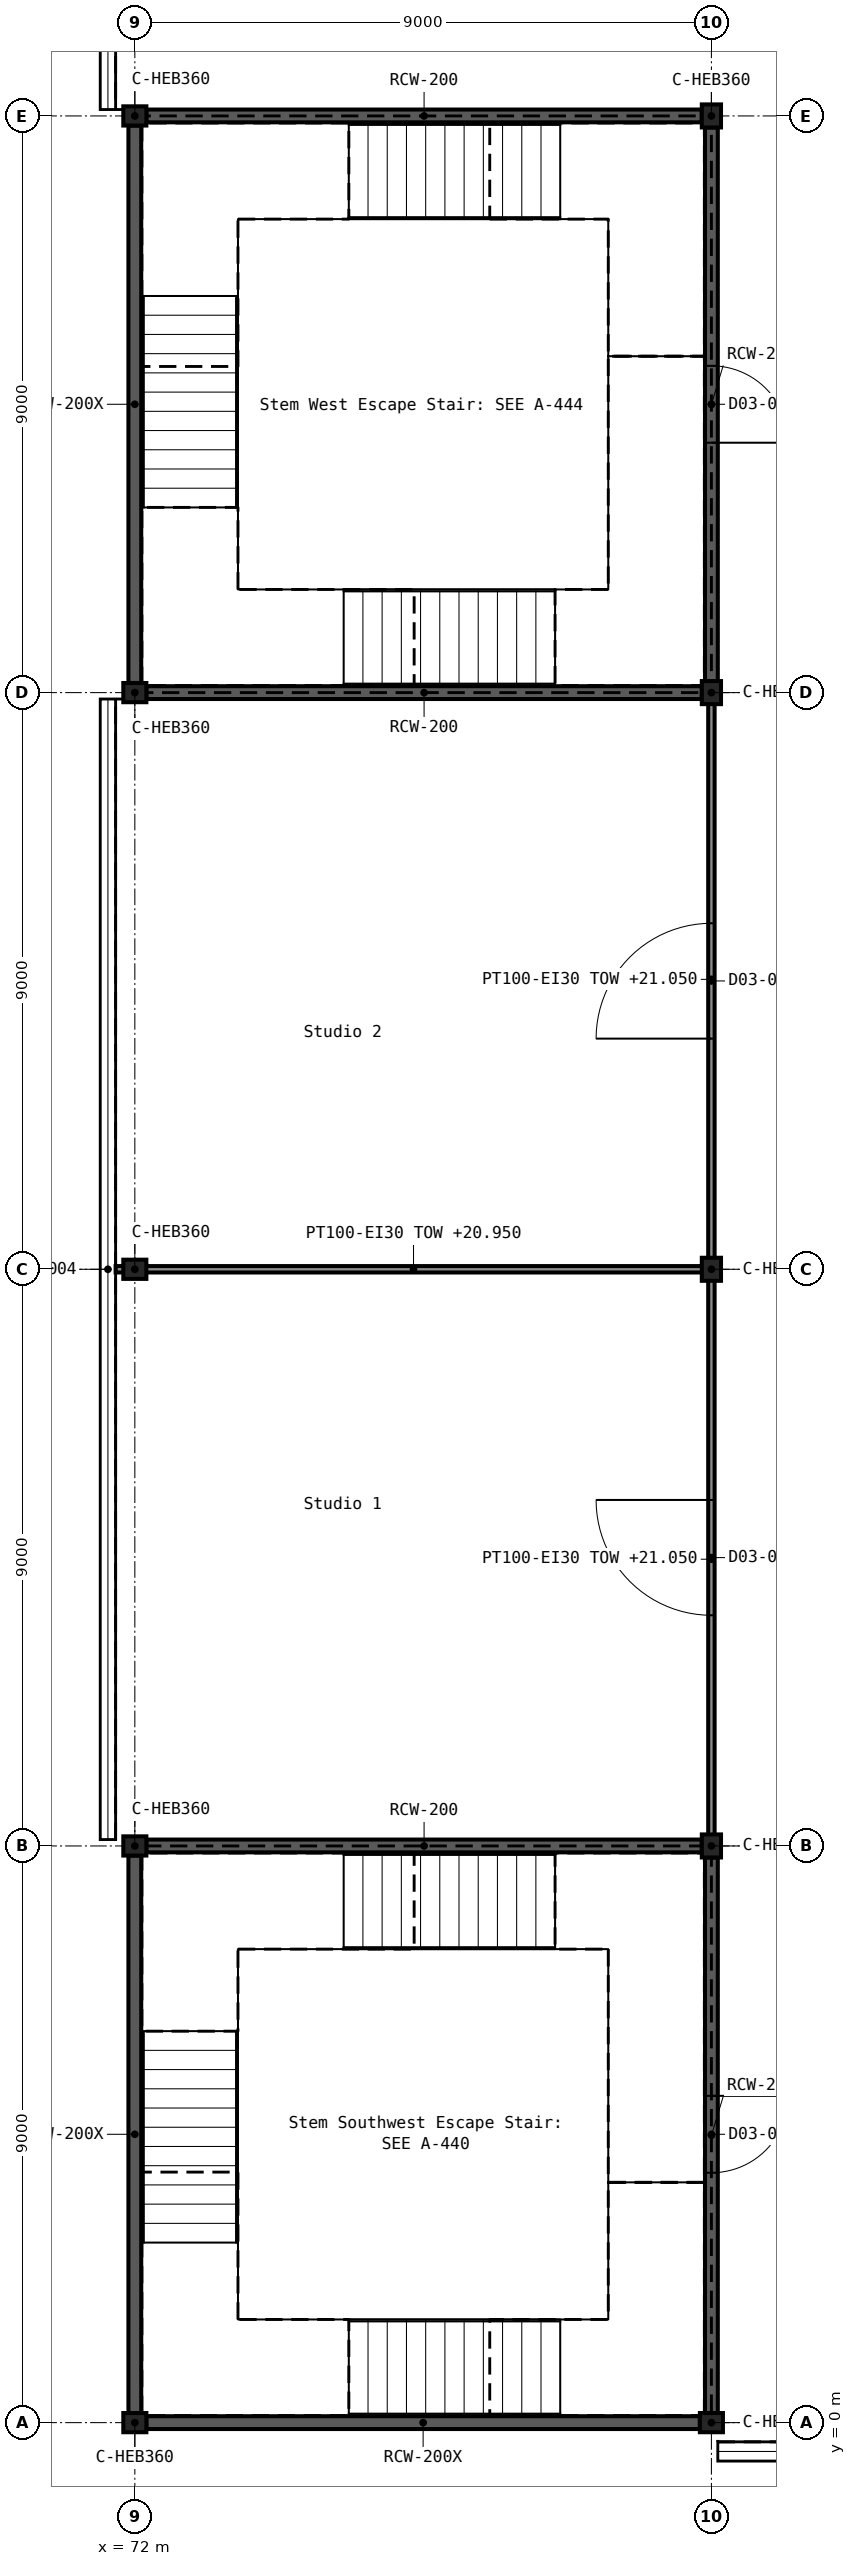
"""IFC4 building model, lengths in metres.
Left out: names, types, materials, properties, quantities, classifications, styles, units other than length and angle.
Written with IfcOpenShell. Run it as: python <this file> out.ifc"""

import sys

from ifc_helpers import new_model, si_unit, direction, frame, frame_2d, origin, origin_2d, place, context, subcontext, project, spatial, rectangle, i_section, extrude, element, fill, save


model = new_model("IFC4")
c1 = context("Model", 3, precision=1e-05, world=origin(), true_north=direction((0.0, 1.0)))
c2 = subcontext(c1, "Body", "Model", "MODEL_VIEW")
j1 = project(units=[si_unit("LENGTHUNIT", "METRE"), si_unit("PLANEANGLEUNIT", "RADIAN")], contexts=[c1])
p1 = place(None, origin())
s1 = spatial("IfcSite", under=j1, at=p1, CompositionType="ELEMENT")
p2 = place(p1, origin())
s2 = spatial("IfcBuilding", under=s1, at=p2, CompositionType="ELEMENT")
p3 = place(p2, frame((0.0, 0.0, 16.2)))
s3 = spatial("IfcBuildingStorey", under=s2, at=p3, CompositionType="ELEMENT", Elevation=16.2)
for number, where, z_axis, x_axis in (
    (1, (72.0, 0.0, 0.0), (0.0, 0.0, 1.0), (0.0, 1.0, 0.0)),
    (2, (81.0, 0.0, 0.0), (0.0, 0.0, 1.0), (0.0, 1.0, 0.0)),
    (3, (72.0, 9.0, 0.0), (0.0, 0.0, 1.0), (0.0, 1.0, 0.0)),
    (4, (81.0, 9.0, 0.0), (0.0, 0.0, 1.0), (1.0, 0.0, 0.0)),
    (5, (72.0, 18.0, 0.0), (0.0, 0.0, 1.0), (0.0, 1.0, 0.0)),
    (6, (81.0, 18.0, 0.0), (0.0, 0.0, 1.0), (1.0, 0.0, 0.0)),
    (7, (72.0, 27.0, 0.0), (0.0, 0.0, 1.0), (0.0, 1.0, 0.0)),
    (8, (81.0, 27.0, 0.0), (0.0, 0.0, 1.0), (1.0, 0.0, 0.0)),
    (9, (72.0, 36.0, 0.0), (0.0, 0.0, 1.0), (0.0, 1.0, 0.0)),
    (10, (81.0, 36.0, 0.0), (0.0, 0.0, 1.0), (1.0, 0.0, 0.0)),
):
    element("IfcColumn", number, at=place(p3, frame(where, z_axis=z_axis, x_axis=x_axis)), inside=s3, PredefinedType="COLUMN", context=c2, shape_type="SweptSolid", body=[
        extrude(i_section(OverallWidth=0.3, OverallDepth=0.36, WebThickness=0.012, FlangeThickness=0.022, FilletRadius=0.027, at=origin_2d()), origin(), (0.0, 0.0, 1.0), 5.4),
    ])
p4 = place(p3, frame((72.18, 0.0, 0.0), z_axis=(0.0, 0.0, 1.0), x_axis=(1.0, 0.0, 0.0)))
e11 = element("IfcWall", 11, at=p4, inside=s3, PredefinedType="SHEAR", context=c2, shape_type="SweptSolid", body=[
    extrude(rectangle(XDim=8.64, YDim=0.2, at=frame_2d((4.32, 0.0))), origin(), (0.0, 0.0, 1.0), 5.4),
])
p5 = place(p3, frame((72.18, 9.0, 0.0), z_axis=(0.0, 0.0, 1.0), x_axis=(1.0, 0.0, 0.0)))
e12 = element("IfcWall", 12, at=p5, inside=s3, PredefinedType="SHEAR", context=c2, shape_type="SweptSolid", body=[
    extrude(rectangle(XDim=8.67, YDim=0.2, at=frame_2d((4.335, 0.0))), origin(), (0.0, 0.0, 1.0), 5.4),
])
p6 = place(p3, frame((72.0, 0.15, 0.0), z_axis=(0.0, 0.0, 1.0), x_axis=(0.0, 1.0, 0.0)))
e13 = element("IfcWall", 13, at=p6, inside=s3, PredefinedType="SHEAR", context=c2, shape_type="SweptSolid", body=[
    extrude(rectangle(XDim=8.7, YDim=0.2, at=frame_2d((4.35, 0.0))), origin(), (0.0, 0.0, 1.0), 5.4),
])
p7 = place(p3, frame((81.0, 0.15, 0.0), z_axis=(0.0, 0.0, 1.0), x_axis=(0.0, 1.0, 0.0)))
e14 = element("IfcWall", 14, at=p7, inside=s3, PredefinedType="SHEAR", context=c2, shape_type="SweptSolid", body=[
    extrude(rectangle(XDim=8.67, YDim=0.2, at=frame_2d((4.335, 0.0))), origin(), (0.0, 0.0, 1.0), 5.4),
])
p8 = place(p7, frame((3.75, 0.0, 0.0)))
e15 = element("IfcOpeningElement", 15, at=p8, cuts=e14, PredefinedType="OPENING", context=c2, shape_type="SweptSolid", body=[
    extrude(rectangle(XDim=1.2, YDim=2.1, at=frame_2d((0.6, 1.05))), frame((0.0, 0.111, 0.0), z_axis=(0.0, -1.0, 0.0), x_axis=(1.0, 0.0, 0.0)), (0.0, 0.0, 1.0), 0.222),
])
for number, where, z_axis, x_axis in (
    (16, (72.18, 27.0, 0.0), (0.0, 0.0, 1.0), (1.0, 0.0, 0.0)),
    (17, (72.18, 36.0, 0.0), (0.0, 0.0, 1.0), (1.0, 0.0, 0.0)),
):
    element("IfcWall", number, at=place(p3, frame(where, z_axis=z_axis, x_axis=x_axis)), inside=s3, PredefinedType="SHEAR", context=c2, shape_type="SweptSolid", body=[
        extrude(rectangle(XDim=8.67, YDim=0.2, at=frame_2d((4.335, 0.0))), origin(), (0.0, 0.0, 1.0), 5.4),
    ])
p9 = place(p3, frame((72.0, 27.15, 0.0), z_axis=(0.0, 0.0, 1.0), x_axis=(0.0, 1.0, 0.0)))
e18 = element("IfcWall", 18, at=p9, inside=s3, PredefinedType="SHEAR", context=c2, shape_type="SweptSolid", body=[
    extrude(rectangle(XDim=8.7, YDim=0.2, at=frame_2d((4.35, 0.0))), origin(), (0.0, 0.0, 1.0), 5.4),
])
p10 = place(p3, frame((81.0, 27.18, 0.0), z_axis=(0.0, 0.0, 1.0), x_axis=(0.0, 1.0, 0.0)))
e19 = element("IfcWall", 19, at=p10, inside=s3, PredefinedType="SHEAR", context=c2, shape_type="SweptSolid", body=[
    extrude(rectangle(XDim=8.64, YDim=0.2, at=frame_2d((4.32, 0.0))), origin(), (0.0, 0.0, 1.0), 5.4),
])
p11 = place(p10, frame((3.72, 0.0, 0.0)))
e20 = element("IfcOpeningElement", 20, at=p11, cuts=e19, PredefinedType="OPENING", context=c2, shape_type="SweptSolid", body=[
    extrude(rectangle(XDim=1.2, YDim=2.1, at=frame_2d((0.6, 1.05))), frame((0.0, 0.111, 0.0), z_axis=(0.0, -1.0, 0.0), x_axis=(1.0, 0.0, 0.0)), (0.0, 0.0, 1.0), 0.222),
])
p12 = place(p3, frame((71.7, 18.0, 0.0), z_axis=(0.0, 0.0, 1.0), x_axis=(1.0, 0.0, 0.0)))
e21 = element("IfcWall", 21, at=p12, inside=s3, PredefinedType="PARTITIONING", context=c2, shape_type="SweptSolid", body=[
    extrude(rectangle(XDim=9.3, YDim=0.1, at=frame_2d((4.65, 0.0))), origin(), (0.0, 0.0, 1.0), 4.75),
])
p13 = place(p3, frame((81.0, 9.0, 0.0), z_axis=(0.0, 0.0, 1.0), x_axis=(0.0, 1.0, 0.0)))
e22 = element("IfcWall", 22, at=p13, inside=s3, PredefinedType="PARTITIONING", context=c2, shape_type="SweptSolid", body=[
    extrude(rectangle(XDim=8.95, YDim=0.1, at=frame_2d((4.475, 0.0))), origin(), (0.0, 0.0, 1.0), 4.85),
])
p14 = place(p13, frame((3.6, 0.0, 0.0)))
e23 = element("IfcOpeningElement", 23, at=p14, cuts=e22, PredefinedType="OPENING", context=c2, shape_type="SweptSolid", body=[
    extrude(rectangle(XDim=1.8, YDim=2.1, at=frame_2d((0.9, 1.05))), frame((0.0, 0.061, 0.0), z_axis=(0.0, -1.0, 0.0), x_axis=(1.0, 0.0, 0.0)), (0.0, 0.0, 1.0), 0.122),
])
p15 = place(p3, frame((81.0, 18.05, 0.0), z_axis=(0.0, 0.0, 1.0), x_axis=(0.0, 1.0, 0.0)))
e24 = element("IfcWall", 24, at=p15, inside=s3, PredefinedType="PARTITIONING", context=c2, shape_type="SweptSolid", body=[
    extrude(rectangle(XDim=8.95, YDim=0.1, at=frame_2d((4.475, 0.0))), origin(), (0.0, 0.0, 1.0), 4.85),
])
p16 = place(p15, frame((3.55, 0.0, 0.0)))
e25 = element("IfcOpeningElement", 25, at=p16, cuts=e24, PredefinedType="OPENING", context=c2, shape_type="SweptSolid", body=[
    extrude(rectangle(XDim=1.8, YDim=2.1, at=frame_2d((0.9, 1.05))), frame((0.0, 0.061, 0.0), z_axis=(0.0, -1.0, 0.0), x_axis=(1.0, 0.0, 0.0)), (0.0, 0.0, 1.0), 0.122),
])
p17 = place(p8, frame((1.2, 0.0, 0.0), z_axis=(0.0, 0.0, 1.0), x_axis=(-1.0, 0.0, 0.0)))
e26 = element("IfcDoor", 26, at=p17, inside=s3, OperationType="SINGLE_SWING_LEFT", PredefinedType="DOOR", context=c2, shape_type="SweptSolid", body=[
    extrude(rectangle(XDim=1.2, YDim=2.1, at=frame_2d((0.6, 1.05))), frame((0.0, 0.025, 0.0), z_axis=(0.0, -1.0, 0.0), x_axis=(1.0, 0.0, 0.0)), (0.0, 0.0, 1.0), 0.05),
])
fill(e15, e26)
p18 = place(p11, frame((1.2, 0.0, 0.0), z_axis=(0.0, 0.0, 1.0), x_axis=(-1.0, 0.0, 0.0)))
e27 = element("IfcDoor", 27, at=p18, inside=s3, OperationType="SINGLE_SWING_RIGHT", PredefinedType="DOOR", context=c2, shape_type="SweptSolid", body=[
    extrude(rectangle(XDim=1.2, YDim=2.1, at=frame_2d((0.6, 1.05))), frame((0.0, 0.025, 0.0), z_axis=(0.0, -1.0, 0.0), x_axis=(1.0, 0.0, 0.0)), (0.0, 0.0, 1.0), 0.05),
])
fill(e20, e27)
p19 = place(p14, origin())
e28 = element("IfcDoor", 28, at=p19, inside=s3, OperationType="DOUBLE_DOOR_SINGLE_SWING", PredefinedType="DOOR", context=c2, shape_type="SweptSolid", body=[
    extrude(rectangle(XDim=1.8, YDim=2.1, at=frame_2d((0.9, 1.05))), frame((0.0, 0.025, 0.0), z_axis=(0.0, -1.0, 0.0), x_axis=(1.0, 0.0, 0.0)), (0.0, 0.0, 1.0), 0.05),
])
fill(e23, e28)
p20 = place(p16, origin())
e29 = element("IfcDoor", 29, at=p20, inside=s3, OperationType="DOUBLE_DOOR_SINGLE_SWING", PredefinedType="DOOR", context=c2, shape_type="SweptSolid", body=[
    extrude(rectangle(XDim=1.8, YDim=2.1, at=frame_2d((0.9, 1.05))), frame((0.0, 0.025, 0.0), z_axis=(0.0, -1.0, 0.0), x_axis=(1.0, 0.0, 0.0)), (0.0, 0.0, 1.0), 0.05),
])
fill(e25, e29)
save(model, sys.argv[1])
